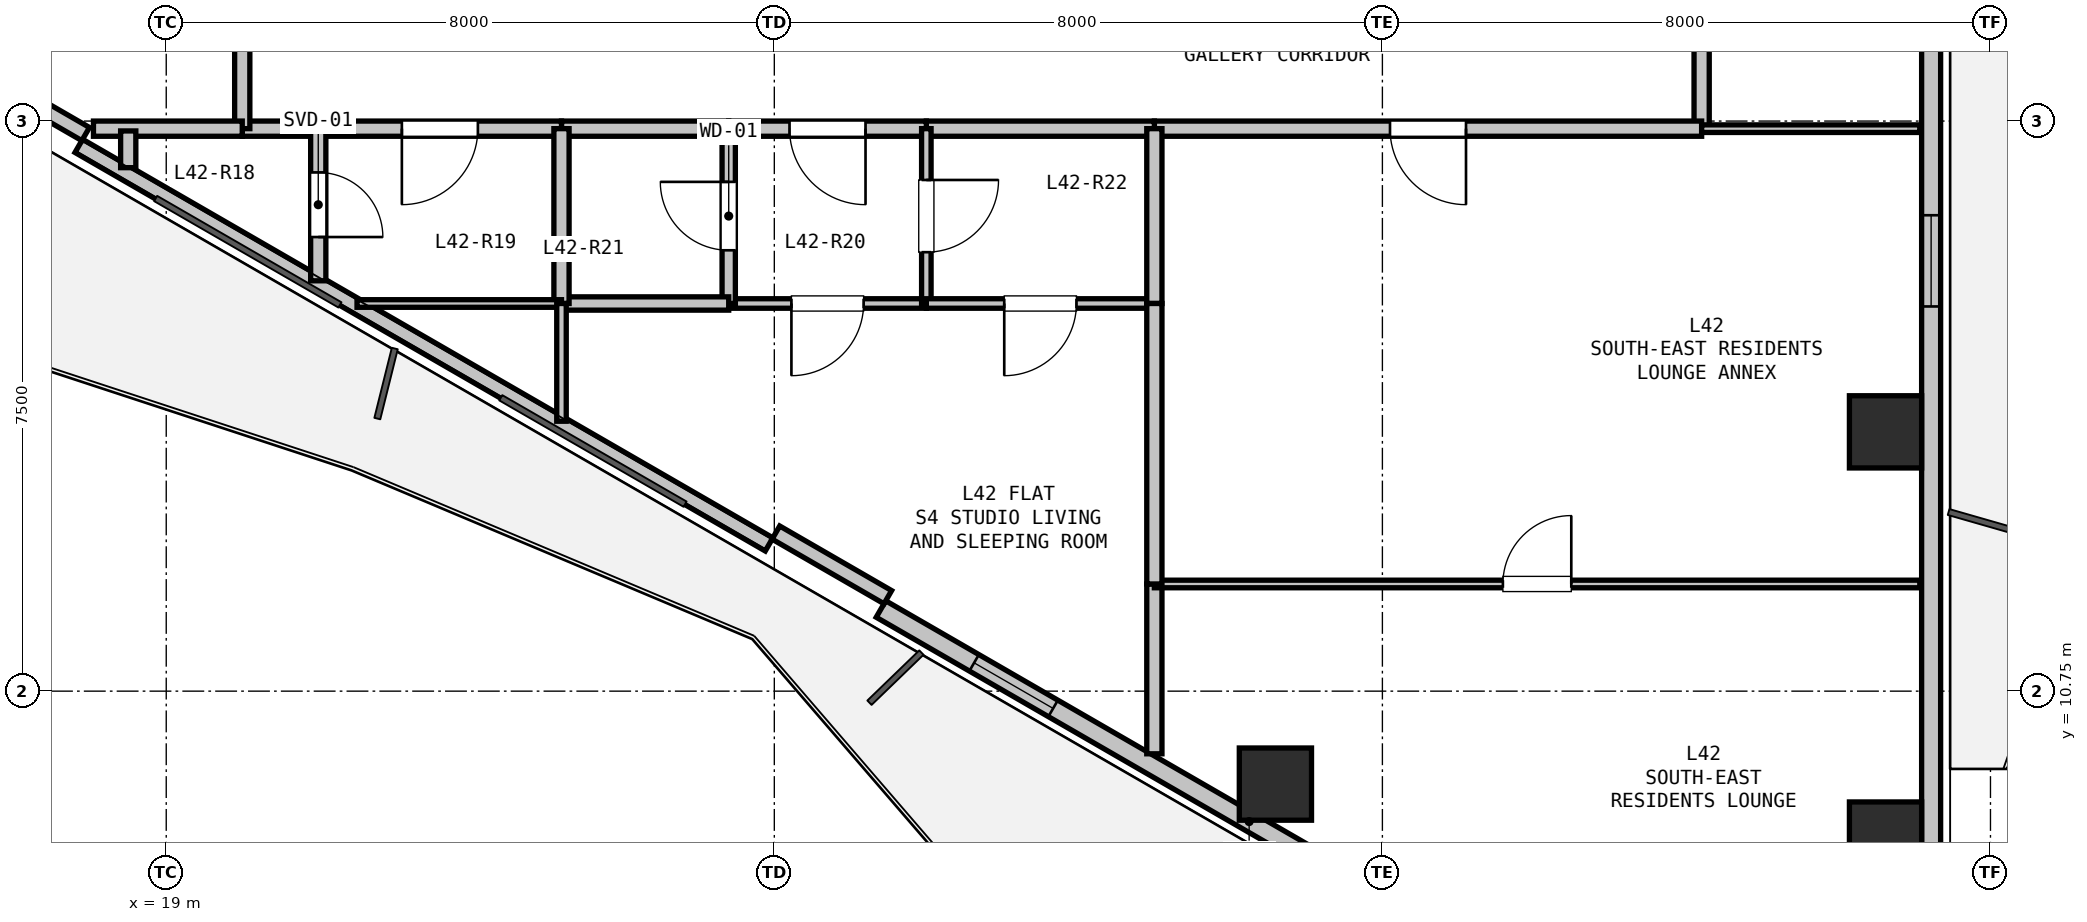
"""IFC4 building model, lengths in metres.
Left out: names, types, materials, properties, quantities, classifications, styles, units other than length and angle.
Written with IfcOpenShell. Run it as: python <this file> out.ifc"""

import sys

from ifc_helpers import new_model, si_unit, direction, frame, frame_2d, origin, origin_2d, place, context, subcontext, project, spatial, rectangle, hollow_rectangle, extrude, element, fill, save


model = new_model("IFC4")
c1 = context("Model", 3, precision=1e-05, world=origin(), true_north=direction((0.0, 1.0)))
c2 = subcontext(c1, "Body", "Model", "MODEL_VIEW")
j1 = project(units=[si_unit("LENGTHUNIT", "METRE"), si_unit("PLANEANGLEUNIT", "RADIAN")], contexts=[c1])
p1 = place(None, origin())
s1 = spatial("IfcSite", under=j1, at=p1, CompositionType="ELEMENT")
p2 = place(p1, origin())
s2 = spatial("IfcBuilding", under=s1, at=p2, CompositionType="ELEMENT")
p3 = place(p2, frame((0.0, 0.0, 150.9)))
s3 = spatial("IfcBuildingStorey", under=s2, at=p3, CompositionType="ELEMENT", Elevation=150.9)
for number, where, z_axis, x_axis in (
    (1, (41.619, 14.161, 0.0), (0.0, 0.0, 1.0), (1.0, 0.0, 0.0)),
    (2, (41.619, 8.817, 0.0), (0.0, 0.0, 1.0), (1.0, 0.0, 0.0)),
    (3, (33.593, 9.527, 0.0), (0.0, 0.0, 1.0), (1.0, 0.0, 0.0)),
):
    element("IfcColumn", number, at=place(p3, frame(where, z_axis=z_axis, x_axis=x_axis)), inside=s3, PredefinedType="COLUMN", context=c2, shape_type="SweptSolid", body=[
        extrude(hollow_rectangle(XDim=0.95, YDim=0.95, WallThickness=0.028, at=origin_2d()), origin(), (0.0, 0.0, 1.0), 3.3),
    ])
p4 = place(p3, frame((42.219, 19.807, 0.0), z_axis=(0.0, 0.0, 1.0), x_axis=(0.0, -1.0, 0.0)))
e4 = element("IfcWall", 4, at=p4, inside=s3, PredefinedType="SOLIDWALL", context=c2, shape_type="SweptSolid", body=[
    extrude(rectangle(XDim=11.186, YDim=0.25, at=frame_2d((5.593, 0.0))), origin(), (0.0, 0.0, 1.0), 2.68),
])
p5 = place(p4, frame((2.796, 0.0, 0.9)))
e5 = element("IfcOpeningElement", 5, at=p5, cuts=e4, PredefinedType="OPENING", context=c2, shape_type="SweptSolid", body=[
    extrude(rectangle(XDim=1.2, YDim=1.5, at=frame_2d((0.6, 0.75))), frame((0.0, 0.135, 0.0), z_axis=(0.0, -1.0, 0.0), x_axis=(1.0, 0.0, 0.0)), (0.0, 0.0, 1.0), 0.27),
])
p6 = place(p3, frame((38.091, 6.237, 0.0), z_axis=(0.0, 0.0, 1.0), x_axis=(-0.86602239209, 0.500005216371, 0.0)))
e6 = element("IfcWall", 6, at=p6, inside=s3, PredefinedType="SOLIDWALL", context=c2, shape_type="SweptSolid", body=[
    extrude(rectangle(XDim=11.186, YDim=0.25, at=frame_2d((5.593, 0.0))), origin(), (0.0, 0.0, 1.0), 2.68),
])
p7 = place(p6, frame((2.027, 0.0, 0.0)))
e7 = element("IfcOpeningElement", 7, at=p7, cuts=e6, PredefinedType="OPENING", context=c2, shape_type="SweptSolid", body=[
    extrude(rectangle(XDim=1.0, YDim=2.1, at=frame_2d((0.5, 1.05))), frame((0.0, 0.135, 0.0), z_axis=(0.0, -1.0, 0.0), x_axis=(1.0, 0.0, 0.0)), (0.0, 0.0, 1.0), 0.27),
])
p8 = place(p6, frame((8.571, 0.0, 0.9)))
e8 = element("IfcOpeningElement", 8, at=p8, cuts=e6, PredefinedType="OPENING", context=c2, shape_type="SweptSolid", body=[
    extrude(rectangle(XDim=1.2, YDim=1.4, at=frame_2d((0.6, 0.7))), frame((0.0, 0.135, 0.0), z_axis=(0.0, -1.0, 0.0), x_axis=(1.0, 0.0, 0.0)), (0.0, 0.0, 1.0), 0.27),
])
p9 = place(p3, frame((26.931, 12.68, 0.0), z_axis=(0.0, 0.0, 1.0), x_axis=(-0.866026619769, 0.499997893847, 0.0)))
e9 = element("IfcWall", 9, at=p9, inside=s3, PredefinedType="PARAPET", context=c2, shape_type="SweptSolid", body=[
    extrude(rectangle(XDim=10.486, YDim=0.2, at=frame_2d((5.243, 0.0))), origin(), (0.0, 0.0, 1.0), 0.2),
])
for number, where, z_axis, x_axis in (
    (10, (28.493, 11.986, 0.0), (0.0, 0.0, 1.0), (-0.866, 0.5, 0.0)),
    (11, (17.94, 18.079, 0.0), (0.0, 0.0, 1.0), (-0.866, 0.5, 0.0)),
):
    element("IfcWall", number, at=place(p3, frame(where, z_axis=z_axis, x_axis=x_axis)), inside=s3, PredefinedType="PARAPET", context=c2, shape_type="SweptSolid", body=[
        extrude(rectangle(XDim=1.7, YDim=0.2, at=frame_2d((0.85, 0.0))), origin(), (0.0, 0.0, 1.0), 2.68),
    ])
p10 = place(p3, frame((39.2, 19.9, 0.0), z_axis=(0.0, 0.0, 1.0), x_axis=(0.0, -1.0, 0.0)))
e12 = element("IfcWall", 12, at=p10, inside=s3, PredefinedType="PARTITIONING", context=c2, shape_type="SweptSolid", body=[
    extrude(rectangle(XDim=1.75, YDim=0.2, at=frame_2d((0.875, 0.0))), origin(), (0.0, 0.0, 1.0), 3.06),
])
p11 = place(p3, frame((39.2, 18.15, 0.0), z_axis=(0.0, 0.0, 1.0), x_axis=(-1.0, 0.0, 0.0)))
e13 = element("IfcWall", 13, at=p11, inside=s3, PredefinedType="PARTITIONING", context=c2, shape_type="SweptSolid", body=[
    extrude(rectangle(XDim=7.2, YDim=0.2, at=frame_2d((3.6, 0.0))), origin(), (0.0, 0.0, 1.0), 2.433),
])
p12 = place(p11, frame((3.1, 0.0, 0.0)))
e14 = element("IfcOpeningElement", 14, at=p12, cuts=e13, PredefinedType="OPENING", context=c2, shape_type="SweptSolid", body=[
    extrude(rectangle(XDim=1.0, YDim=2.15, at=frame_2d((0.5, 1.075))), frame((0.0, 0.11, 0.0), z_axis=(0.0, -1.0, 0.0), x_axis=(1.0, 0.0, 0.0)), (0.0, 0.0, 1.0), 0.22),
])
p13 = place(p3, frame((32.0, 18.15, 0.0), z_axis=(0.0, 0.0, 1.0), x_axis=(-1.0, 0.0, 0.0)))
e15 = element("IfcWall", 15, at=p13, inside=s3, PredefinedType="PARTITIONING", context=c2, shape_type="SweptSolid", body=[
    extrude(rectangle(XDim=3.0, YDim=0.2, at=frame_2d((1.5, 0.0))), origin(), (0.0, 0.0, 1.0), 3.06),
])
p14 = place(p3, frame((29.0, 18.15, 0.0), z_axis=(0.0, 0.0, 1.0), x_axis=(-1.0, 0.0, 0.0)))
e16 = element("IfcWall", 16, at=p14, inside=s3, PredefinedType="PARTITIONING", context=c2, shape_type="SweptSolid", body=[
    extrude(rectangle(XDim=2.6, YDim=0.2, at=frame_2d((1.3, 0.0))), origin(), (0.0, 0.0, 1.0), 3.06),
])
p15 = place(p14, frame((0.8, 0.0, 0.0)))
e17 = element("IfcOpeningElement", 17, at=p15, cuts=e16, PredefinedType="OPENING", context=c2, shape_type="SweptSolid", body=[
    extrude(rectangle(XDim=1.0, YDim=2.15, at=frame_2d((0.5, 1.075))), frame((0.0, 0.11, 0.0), z_axis=(0.0, -1.0, 0.0), x_axis=(1.0, 0.0, 0.0)), (0.0, 0.0, 1.0), 0.22),
])
p16 = place(p3, frame((26.4, 18.15, 0.0), z_axis=(0.0, 0.0, 1.0), x_axis=(-1.0, 0.0, 0.0)))
e18 = element("IfcWall", 18, at=p16, inside=s3, PredefinedType="PARTITIONING", context=c2, shape_type="SweptSolid", body=[
    extrude(rectangle(XDim=2.2, YDim=0.2, at=frame_2d((1.1, 0.0))), origin(), (0.0, 0.0, 1.0), 2.433),
])
p17 = place(p3, frame((24.2, 18.15, 0.0), z_axis=(0.0, 0.0, 1.0), x_axis=(-1.0, 0.0, 0.0)))
e19 = element("IfcWall", 19, at=p17, inside=s3, PredefinedType="PARTITIONING", context=c2, shape_type="SweptSolid", body=[
    extrude(rectangle(XDim=3.2, YDim=0.2, at=frame_2d((1.6, 0.0))), origin(), (0.0, 0.0, 1.0), 2.433),
])
p18 = place(p17, frame((1.1, 0.0, 0.0)))
e20 = element("IfcOpeningElement", 20, at=p18, cuts=e19, PredefinedType="OPENING", context=c2, shape_type="SweptSolid", body=[
    extrude(rectangle(XDim=1.0, YDim=2.15, at=frame_2d((0.5, 1.075))), frame((0.0, 0.11, 0.0), z_axis=(0.0, -1.0, 0.0), x_axis=(1.0, 0.0, 0.0)), (0.0, 0.0, 1.0), 0.22),
])
p19 = place(p3, frame((21.0, 18.15, 0.0), z_axis=(0.0, 0.0, 1.0), x_axis=(-1.0, 0.0, 0.0)))
e21 = element("IfcWall", 21, at=p19, inside=s3, PredefinedType="PARTITIONING", context=c2, shape_type="SweptSolid", body=[
    extrude(rectangle(XDim=1.0, YDim=0.2, at=frame_2d((0.5, 0.0))), origin(), (0.0, 0.0, 1.0), 3.06),
])
p20 = place(p3, frame((20.0, 18.15, 0.0), z_axis=(0.0, 0.0, 1.0), x_axis=(0.0, 1.0, 0.0)))
e22 = element("IfcWall", 22, at=p20, inside=s3, PredefinedType="PARTITIONING", context=c2, shape_type="SweptSolid", body=[
    extrude(rectangle(XDim=1.75, YDim=0.2, at=frame_2d((0.875, 0.0))), origin(), (0.0, 0.0, 1.0), 3.06),
])
p21 = place(p3, frame((29.0, 15.85, 0.0), z_axis=(0.0, 0.0, 1.0), x_axis=(-1.0, 0.0, 0.0)))
e23 = element("IfcWall", 23, at=p21, inside=s3, PredefinedType="PARTITIONING", context=c2, shape_type="SweptSolid", body=[
    extrude(rectangle(XDim=2.6, YDim=0.125, at=frame_2d((1.3, 0.0))), origin(), (0.0, 0.0, 1.0), 2.433),
])
p22 = place(p21, frame((0.825, 0.0, 0.0)))
e24 = element("IfcOpeningElement", 24, at=p22, cuts=e23, PredefinedType="OPENING", context=c2, shape_type="SweptSolid", body=[
    extrude(rectangle(XDim=0.95, YDim=2.1, at=frame_2d((0.475, 1.05))), frame((0.0, 0.073, 0.0), z_axis=(0.0, -1.0, 0.0), x_axis=(1.0, 0.0, 0.0)), (0.0, 0.0, 1.0), 0.145),
])
p23 = place(p3, frame((26.4, 15.85, 0.0), z_axis=(0.0, 0.0, 1.0), x_axis=(0.0, 1.0, 0.0)))
e25 = element("IfcWall", 25, at=p23, inside=s3, PredefinedType="PLUMBINGWALL", context=c2, shape_type="SweptSolid", body=[
    extrude(rectangle(XDim=2.3, YDim=0.175, at=frame_2d((1.15, 0.0))), origin(), (0.0, 0.0, 1.0), 2.433),
])
p24 = place(p23, frame((0.7, 0.0, 0.0)))
e26 = element("IfcOpeningElement", 26, at=p24, cuts=e25, PredefinedType="OPENING", context=c2, shape_type="SweptSolid", body=[
    extrude(rectangle(XDim=0.9, YDim=2.1, at=frame_2d((0.45, 1.05))), frame((0.0, 0.097, 0.0), z_axis=(0.0, -1.0, 0.0), x_axis=(1.0, 0.0, 0.0)), (0.0, 0.0, 1.0), 0.195),
])
p25 = place(p3, frame((29.0, 18.15, 0.0), z_axis=(0.0, 0.0, 1.0), x_axis=(0.0, -1.0, 0.0)))
e27 = element("IfcWall", 27, at=p25, inside=s3, PredefinedType="PARTITIONING", context=c2, shape_type="SweptSolid", body=[
    extrude(rectangle(XDim=2.3, YDim=0.125, at=frame_2d((1.15, 0.0))), origin(), (0.0, 0.0, 1.0), 3.06),
])
p26 = place(p25, frame((0.675, 0.0, 0.0)))
e28 = element("IfcOpeningElement", 28, at=p26, cuts=e27, PredefinedType="OPENING", context=c2, shape_type="SweptSolid", body=[
    extrude(rectangle(XDim=0.95, YDim=2.1, at=frame_2d((0.475, 1.05))), frame((0.0, 0.073, 0.0), z_axis=(0.0, -1.0, 0.0), x_axis=(1.0, 0.0, 0.0)), (0.0, 0.0, 1.0), 0.145),
])
p27 = place(p3, frame((26.4, 15.85, 0.0), z_axis=(0.0, 0.0, 1.0), x_axis=(-1.0, 0.0, 0.0)))
e29 = element("IfcWall", 29, at=p27, inside=s3, PredefinedType="PLUMBINGWALL", context=c2, shape_type="SweptSolid", body=[
    extrude(rectangle(XDim=2.2, YDim=0.175, at=frame_2d((1.1, 0.0))), origin(), (0.0, 0.0, 1.0), 3.06),
])
p28 = place(p3, frame((24.2, 15.85, 0.0), z_axis=(0.0, 0.0, 1.0), x_axis=(0.0, 1.0, 0.0)))
e30 = element("IfcWall", 30, at=p28, inside=s3, PredefinedType="PARTITIONING", context=c2, shape_type="SweptSolid", body=[
    extrude(rectangle(XDim=2.3, YDim=0.2, at=frame_2d((1.15, 0.0))), origin(), (0.0, 0.0, 1.0), 2.433),
])
p29 = place(p3, frame((32.0, 15.85, 0.0), z_axis=(0.0, 0.0, 1.0), x_axis=(-1.0, 0.0, 0.0)))
e31 = element("IfcWall", 31, at=p29, inside=s3, PredefinedType="PARTITIONING", context=c2, shape_type="SweptSolid", body=[
    extrude(rectangle(XDim=3.0, YDim=0.125, at=frame_2d((1.5, 0.0))), origin(), (0.0, 0.0, 1.0), 3.06),
])
p30 = place(p29, frame((1.025, 0.0, 0.0)))
e32 = element("IfcOpeningElement", 32, at=p30, cuts=e31, PredefinedType="OPENING", context=c2, shape_type="SweptSolid", body=[
    extrude(rectangle(XDim=0.95, YDim=2.1, at=frame_2d((0.475, 1.05))), frame((0.0, 0.073, 0.0), z_axis=(0.0, -1.0, 0.0), x_axis=(1.0, 0.0, 0.0)), (0.0, 0.0, 1.0), 0.145),
])
p31 = place(p3, frame((32.0, 18.15, 0.0), z_axis=(0.0, 0.0, 1.0), x_axis=(0.0, -1.0, 0.0)))
e33 = element("IfcWall", 33, at=p31, inside=s3, PredefinedType="PARTITIONING", context=c2, shape_type="SweptSolid", body=[
    extrude(rectangle(XDim=2.3, YDim=0.2, at=frame_2d((1.15, 0.0))), origin(), (0.0, 0.0, 1.0), 3.06),
])
p32 = place(p3, frame((32.0, 9.926, 0.0), z_axis=(0.0, 0.0, 1.0), x_axis=(0.0, 1.0, 0.0)))
e34 = element("IfcWall", 34, at=p32, inside=s3, PredefinedType="PARTITIONING", context=c2, shape_type="SweptSolid", body=[
    extrude(rectangle(XDim=2.234, YDim=0.2, at=frame_2d((1.117, 0.0))), origin(), (0.0, 0.0, 1.0), 2.365),
])
p33 = place(p3, frame((32.0, 12.16, 0.0), z_axis=(0.0, 0.0, 1.0), x_axis=(1.0, 0.0, 0.0)))
e35 = element("IfcWall", 35, at=p33, inside=s3, PredefinedType="PARTITIONING", context=c2, shape_type="SweptSolid", body=[
    extrude(rectangle(XDim=10.07, YDim=0.1, at=frame_2d((5.035, 0.0))), origin(), (0.0, 0.0, 1.0), 2.433),
])
p34 = place(p33, frame((4.585, 0.0, 0.0)))
e36 = element("IfcOpeningElement", 36, at=p34, cuts=e35, PredefinedType="OPENING", context=c2, shape_type="SweptSolid", body=[
    extrude(rectangle(XDim=0.9, YDim=2.1, at=frame_2d((0.45, 1.05))), frame((0.0, 0.06, 0.0), z_axis=(0.0, -1.0, 0.0), x_axis=(1.0, 0.0, 0.0)), (0.0, 0.0, 1.0), 0.12),
])
p35 = place(p3, frame((39.2, 18.15, 0.0), z_axis=(0.0, 0.0, 1.0), x_axis=(1.0, 0.0, 0.0)))
e37 = element("IfcWall", 37, at=p35, inside=s3, PredefinedType="PARTITIONING", context=c2, shape_type="SweptSolid", body=[
    extrude(rectangle(XDim=2.87, YDim=0.1, at=frame_2d((1.435, 0.0))), origin(), (0.0, 0.0, 1.0), 2.365),
])
p36 = place(p3, frame((32.0, 12.16, 0.0), z_axis=(0.0, 0.0, 1.0), x_axis=(0.0, 1.0, 0.0)))
e38 = element("IfcWall", 38, at=p36, inside=s3, PredefinedType="PARTITIONING", context=c2, shape_type="SweptSolid", body=[
    extrude(rectangle(XDim=3.69, YDim=0.2, at=frame_2d((1.845, 0.0))), origin(), (0.0, 0.0, 1.0), 3.06),
])
p37 = place(p3, frame((18.042, 18.15, 0.0), z_axis=(0.0, 0.0, 1.0), x_axis=(1.0, 0.0, 0.0)))
e39 = element("IfcWall", 39, at=p37, inside=s3, PredefinedType="PARTITIONING", context=c2, shape_type="SweptSolid", body=[
    extrude(rectangle(XDim=1.958, YDim=0.2, at=frame_2d((0.979, 0.0))), origin(), (0.0, 0.0, 1.0), 2.365),
])
p38 = place(p3, frame((21.0, 18.15, 0.0), z_axis=(0.0, 0.0, 1.0), x_axis=(0.0, -1.0, 0.0)))
e40 = element("IfcWall", 40, at=p38, inside=s3, PredefinedType="PARTITIONING", context=c2, shape_type="SweptSolid", body=[
    extrude(rectangle(XDim=2.001, YDim=0.2, at=frame_2d((1.001, 0.0))), origin(), (0.0, 0.0, 1.0), 2.365),
])
p39 = place(p38, frame((0.576, 0.0, 0.0)))
e41 = element("IfcOpeningElement", 41, at=p39, cuts=e40, PredefinedType="OPENING", context=c2, shape_type="SweptSolid", body=[
    extrude(rectangle(XDim=0.85, YDim=2.1, at=frame_2d((0.425, 1.05))), frame((0.0, 0.11, 0.0), z_axis=(0.0, -1.0, 0.0), x_axis=(1.0, 0.0, 0.0)), (0.0, 0.0, 1.0), 0.22),
])
p40 = place(p3, frame((18.5, 17.637, 0.0), z_axis=(0.0, 0.0, 1.0), x_axis=(0.0, 1.0, 0.0)))
e42 = element("IfcWall", 42, at=p40, inside=s3, PredefinedType="PARTITIONING", context=c2, shape_type="SweptSolid", body=[
    extrude(rectangle(XDim=0.483, YDim=0.2, at=frame_2d((0.242, 0.0))), origin(), (0.0, 0.0, 1.0), 2.365),
])
p41 = place(p3, frame((24.2, 15.85, 0.0), z_axis=(0.0, 0.0, 1.0), x_axis=(-1.0, 0.0, 0.0)))
e43 = element("IfcWall", 43, at=p41, inside=s3, PredefinedType="PARTITIONING", context=c2, shape_type="SweptSolid", body=[
    extrude(rectangle(XDim=2.69, YDim=0.1, at=frame_2d((1.345, 0.0))), origin(), (0.0, 0.0, 1.0), 2.365),
])
p42 = place(p3, frame((24.2, 14.301, 0.0), z_axis=(0.0, 0.0, 1.0), x_axis=(0.0, 1.0, 0.0)))
e44 = element("IfcWall", 44, at=p42, inside=s3, PredefinedType="PARTITIONING", context=c2, shape_type="SweptSolid", body=[
    extrude(rectangle(XDim=1.549, YDim=0.125, at=frame_2d((0.774, 0.0))), origin(), (0.0, 0.0, 1.0), 2.365),
])
p43 = place(p5, origin())
e45 = element("IfcWindow", 45, at=p43, inside=s3, PartitioningType="SINGLE_PANEL", PredefinedType="WINDOW", context=c2, shape_type="SweptSolid", body=[
    extrude(rectangle(XDim=1.2, YDim=1.5, at=frame_2d((0.6, 0.75))), frame((0.0, 0.03, 0.0), z_axis=(0.0, -1.0, 0.0), x_axis=(1.0, 0.0, 0.0)), (0.0, 0.0, 1.0), 0.06),
])
fill(e5, e45)
p44 = place(p8, origin())
e46 = element("IfcWindow", 46, at=p44, inside=s3, PartitioningType="SINGLE_PANEL", PredefinedType="WINDOW", context=c2, shape_type="SweptSolid", body=[
    extrude(rectangle(XDim=1.2, YDim=1.4, at=frame_2d((0.6, 0.7))), frame((0.0, 0.03, 0.0), z_axis=(0.0, -1.0, 0.0), x_axis=(1.0, 0.0, 0.0)), (0.0, 0.0, 1.0), 0.06),
])
fill(e8, e46)
p45 = place(p15, origin())
e47 = element("IfcDoor", 47, at=p45, inside=s3, OperationType="SINGLE_SWING_LEFT", PredefinedType="DOOR", context=c2, shape_type="SweptSolid", body=[
    extrude(rectangle(XDim=1.0, YDim=2.15, at=frame_2d((0.5, 1.075))), frame((0.0, 0.025, 0.0), z_axis=(0.0, -1.0, 0.0), x_axis=(1.0, 0.0, 0.0)), (0.0, 0.0, 1.0), 0.05),
])
fill(e17, e47)
p46 = place(p12, origin())
e48 = element("IfcDoor", 48, at=p46, inside=s3, OperationType="SINGLE_SWING_LEFT", PredefinedType="DOOR", context=c2, shape_type="SweptSolid", body=[
    extrude(rectangle(XDim=1.0, YDim=2.15, at=frame_2d((0.5, 1.075))), frame((0.0, 0.025, 0.0), z_axis=(0.0, -1.0, 0.0), x_axis=(1.0, 0.0, 0.0)), (0.0, 0.0, 1.0), 0.05),
])
fill(e14, e48)
p47 = place(p18, origin())
e49 = element("IfcDoor", 49, at=p47, inside=s3, OperationType="SINGLE_SWING_RIGHT", PredefinedType="DOOR", context=c2, shape_type="SweptSolid", body=[
    extrude(rectangle(XDim=1.0, YDim=2.15, at=frame_2d((0.5, 1.075))), frame((0.0, 0.025, 0.0), z_axis=(0.0, -1.0, 0.0), x_axis=(1.0, 0.0, 0.0)), (0.0, 0.0, 1.0), 0.05),
])
fill(e20, e49)
p48 = place(p24, origin())
e50 = element("IfcDoor", 50, at=p48, inside=s3, OperationType="SINGLE_SWING_RIGHT", PredefinedType="DOOR", context=c2, shape_type="SweptSolid", body=[
    extrude(rectangle(XDim=0.9, YDim=2.1, at=frame_2d((0.45, 1.05))), frame((0.0, 0.025, 0.0), z_axis=(0.0, -1.0, 0.0), x_axis=(1.0, 0.0, 0.0)), (0.0, 0.0, 1.0), 0.05),
])
fill(e26, e50)
p49 = place(p26, origin())
e51 = element("IfcDoor", 51, at=p49, inside=s3, OperationType="SINGLE_SWING_LEFT", PredefinedType="DOOR", context=c2, shape_type="SweptSolid", body=[
    extrude(rectangle(XDim=0.95, YDim=2.1, at=frame_2d((0.475, 1.05))), frame((0.0, 0.025, 0.0), z_axis=(0.0, -1.0, 0.0), x_axis=(1.0, 0.0, 0.0)), (0.0, 0.0, 1.0), 0.05),
])
fill(e28, e51)
p50 = place(p22, origin())
e52 = element("IfcDoor", 52, at=p50, inside=s3, OperationType="SINGLE_SWING_RIGHT", PredefinedType="DOOR", context=c2, shape_type="SweptSolid", body=[
    extrude(rectangle(XDim=0.95, YDim=2.1, at=frame_2d((0.475, 1.05))), frame((0.0, 0.025, 0.0), z_axis=(0.0, -1.0, 0.0), x_axis=(1.0, 0.0, 0.0)), (0.0, 0.0, 1.0), 0.05),
])
fill(e24, e52)
p51 = place(p30, origin())
e53 = element("IfcDoor", 53, at=p51, inside=s3, OperationType="SINGLE_SWING_RIGHT", PredefinedType="DOOR", context=c2, shape_type="SweptSolid", body=[
    extrude(rectangle(XDim=0.95, YDim=2.1, at=frame_2d((0.475, 1.05))), frame((0.0, 0.025, 0.0), z_axis=(0.0, -1.0, 0.0), x_axis=(1.0, 0.0, 0.0)), (0.0, 0.0, 1.0), 0.05),
])
fill(e32, e53)
p52 = place(p34, origin())
e54 = element("IfcDoor", 54, at=p52, inside=s3, OperationType="SINGLE_SWING_RIGHT", PredefinedType="DOOR", context=c2, shape_type="SweptSolid", body=[
    extrude(rectangle(XDim=0.9, YDim=2.1, at=frame_2d((0.45, 1.05))), frame((0.0, 0.025, 0.0), z_axis=(0.0, -1.0, 0.0), x_axis=(1.0, 0.0, 0.0)), (0.0, 0.0, 1.0), 0.05),
])
fill(e36, e54)
p53 = place(p39, origin())
e55 = element("IfcDoor", 55, at=p53, inside=s3, OperationType="SINGLE_SWING_RIGHT", PredefinedType="DOOR", context=c2, shape_type="SweptSolid", body=[
    extrude(rectangle(XDim=0.85, YDim=2.1, at=frame_2d((0.425, 1.05))), frame((0.0, 0.025, 0.0), z_axis=(0.0, -1.0, 0.0), x_axis=(1.0, 0.0, 0.0)), (0.0, 0.0, 1.0), 0.05),
])
fill(e41, e55)
save(model, sys.argv[1])
